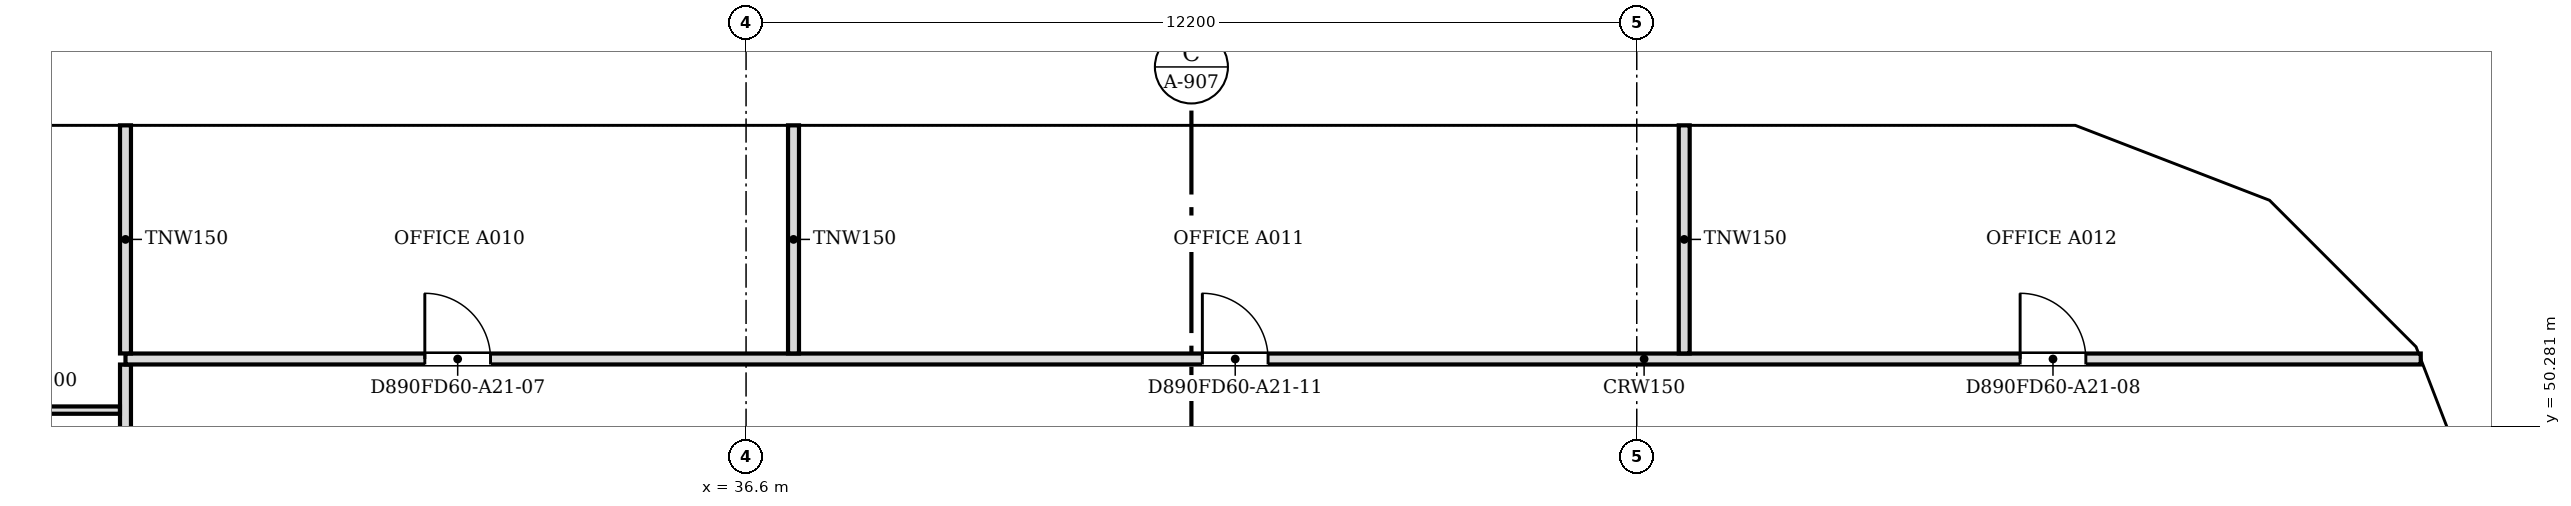
"""IFC4 building model, lengths in metres.
Left out: names, types, materials, properties, quantities, classifications, styles, units other than length and angle.
Written with IfcOpenShell. Run it as: python <this file> out.ifc"""

import sys

from ifc_helpers import new_model, si_unit, direction, frame, frame_2d, origin, place, context, subcontext, project, spatial, polyline, rectangle, outline, extrude, faceted_brep, source, transform, mapped, element, fill, save


model = new_model("IFC4")
c1 = context("Model", 3, precision=1e-05, world=origin(), true_north=direction((0.0, 1.0)))
c2 = subcontext(c1, "Body", "Model", "MODEL_VIEW")
j1 = project(units=[si_unit("LENGTHUNIT", "METRE"), si_unit("PLANEANGLEUNIT", "RADIAN")], contexts=[c1])
p1 = place(None, origin())
s1 = spatial("IfcSite", under=j1, at=p1, CompositionType="ELEMENT")
p2 = place(p1, origin())
s2 = spatial("IfcBuilding", under=s1, at=p2, CompositionType="ELEMENT")
p3 = place(p2, frame((0.0, 0.0, 248.3)))
s3 = spatial("IfcBuildingStorey", under=s2, at=p3, CompositionType="ELEMENT", Elevation=248.3)
m1 = source(origin(), c2, "Body", "Brep", [
    faceted_brep([(0.047, -0.25, 0.0), (2.997, -0.25, 3.8), (0.047, -0.25, 7.6), (0.0, -0.25, 7.541), (0.0, -0.25, 0.059), (0.093, 0.25, 7.54), (2.944, 0.25, 3.868), (2.944, 0.25, 3.732), (0.093, 0.25, 0.06), (2.997, 0.0, 3.8), (0.047, 0.0, 0.0), (0.047, 0.0, 7.6)], [[[0, 1, 2, 3, 4]], [[5, 6, 7, 8]], [[8, 7, 9, 1, 0, 10]], [[6, 5, 11, 2, 1, 9]], [[3, 2, 11]], [[10, 0, 4]], [[8, 10, 4, 3, 11, 5]], [[9, 7, 6]]]),
])
p4 = place(p3, frame((60.767, 48.71, -3.8), z_axis=(0.0, 0.0, 1.0), x_axis=(-0.359901446078, 0.932990326376, 0.0)))
e1 = element("IfcWall", 1, at=p4, inside=s3, PredefinedType="SOLIDWALL", context=c2, shape_type="MappedRepresentation", body=[
    mapped(m1, transform((0.0, 0.0, 0.0), scale=1.0)),
])
m2 = source(origin(), c2, "Body", "SweptSolid", [
    extrude(outline(polyline([(0.247, 0.665), (2.681, 3.8), (0.247, 6.935), (0.247, 0.665)])), frame((0.0, 0.26, 0.0), z_axis=(0.0, -1.0, 0.0), x_axis=(1.0, 0.0, 0.0)), (0.0, 0.0, 1.0), 0.52),
])
p5 = place(p4, origin())
e2 = element("IfcOpeningElement", 2, at=p5, cuts=e1, PredefinedType="OPENING", context=c2, shape_type="MappedRepresentation", body=[
    mapped(m2, transform((0.0, 0.0, 0.0), scale=1.0)),
])
m3 = source(origin(), c2, "Body", "Brep", [
    faceted_brep([(2.944, -0.25, 0.0), (2.997, -0.25, 0.068), (2.997, -0.25, 7.532), (2.944, -0.25, 7.6), (0.0, -0.25, 3.8), (0.053, 0.25, 3.868), (2.891, 0.25, 7.532), (2.891, 0.25, 0.068), (0.053, 0.25, 3.732), (2.944, 0.0, 0.0), (2.944, 0.0, 7.6), (0.0, 0.0, 3.8)], [[[0, 1, 2, 3, 4]], [[5, 6, 7, 8]], [[1, 0, 9]], [[10, 3, 2]], [[6, 5, 11, 4, 3, 10]], [[8, 7, 9, 0, 4, 11]], [[8, 11, 5]], [[1, 9, 7, 6, 10, 2]]]),
])
p6 = place(p3, frame((59.688, 51.506, -3.8), z_axis=(0.0, 0.0, 1.0), x_axis=(-0.707106781187, 0.707106781187, 0.0)))
e3 = element("IfcWall", 3, at=p6, inside=s3, PredefinedType="SOLIDWALL", context=c2, shape_type="MappedRepresentation", body=[
    mapped(m3, transform((0.0, 0.0, 0.0), scale=1.0)),
])
m4 = source(origin(), c2, "Body", "SweptSolid", [
    extrude(outline(polyline([(2.744, 6.934), (0.316, 3.8), (2.744, 0.666), (2.744, 6.934)])), frame((0.0, 0.26, 0.0), z_axis=(0.0, -1.0, 0.0), x_axis=(1.0, 0.0, 0.0)), (0.0, 0.0, 1.0), 0.52),
])
p7 = place(p6, origin())
e4 = element("IfcOpeningElement", 4, at=p7, cuts=e3, PredefinedType="OPENING", context=c2, shape_type="MappedRepresentation", body=[
    mapped(m4, transform((0.0, 0.0, 0.0), scale=1.0)),
])
m5 = source(origin(), c2, "Body", "Brep", [
    faceted_brep([(0.053, -0.25, 0.0), (3.003, -0.25, 3.8), (0.053, -0.25, 7.6), (0.0, -0.25, 7.532), (0.0, -0.25, 0.068), (0.106, 0.25, 7.532), (2.957, 0.25, 3.86), (2.957, 0.25, 3.74), (0.106, 0.25, 0.068), (3.003, 0.0, 3.8), (0.053, 0.0, 0.0), (0.053, 0.0, 7.6)], [[[0, 1, 2, 3, 4]], [[5, 6, 7, 8]], [[8, 7, 9, 1, 0, 10]], [[6, 5, 11, 2, 1, 9]], [[3, 2, 11]], [[10, 0, 4]], [[8, 10, 4, 3, 11, 5]], [[9, 7, 6]]]),
])
p8 = place(p3, frame((57.656, 53.569, -3.8), z_axis=(0.0, 0.0, 1.0), x_axis=(-0.933007896601, 0.359855894603, 0.0)))
e5 = element("IfcWall", 5, at=p8, inside=s3, PredefinedType="SOLIDWALL", context=c2, shape_type="MappedRepresentation", body=[
    mapped(m5, transform((0.0, 0.0, 0.0), scale=1.0)),
])
m6 = source(origin(), c2, "Body", "SweptSolid", [
    extrude(outline(polyline([(0.253, 0.665), (2.687, 3.8), (0.253, 6.935), (0.253, 0.665)])), frame((0.0, 0.26, 0.0), z_axis=(0.0, -1.0, 0.0), x_axis=(1.0, 0.0, 0.0)), (0.0, 0.0, 1.0), 0.52),
])
p9 = place(p8, origin())
e6 = element("IfcOpeningElement", 6, at=p9, cuts=e5, PredefinedType="OPENING", context=c2, shape_type="MappedRepresentation", body=[
    mapped(m6, transform((0.0, 0.0, 0.0), scale=1.0)),
])
m7 = source(origin(), c2, "Body", "Brep", [
    faceted_brep([(3.003, -0.25, 0.0), (6.053, -0.25, 3.8), (3.003, -0.25, 7.6), (0.0, -0.25, 3.8), (0.047, 0.25, 3.859), (3.003, 0.25, 7.6), (6.053, 0.25, 3.8), (3.003, 0.25, 0.0), (0.047, 0.25, 3.741), (0.0, 0.0, 3.8)], [[[0, 1, 2, 3]], [[4, 5, 6, 7, 8]], [[7, 6, 1, 0]], [[6, 5, 2, 1]], [[5, 4, 9, 3, 2]], [[8, 7, 0, 3, 9]], [[8, 9, 4]]]),
])
p10 = place(p3, frame((54.854, 54.65, -3.8), z_axis=(0.0, 0.0, 1.0), x_axis=(-1.0, 0.0, 0.0)))
e7 = element("IfcWall", 7, at=p10, inside=s3, PredefinedType="SOLIDWALL", context=c2, shape_type="MappedRepresentation", body=[
    mapped(m7, transform((0.0, 0.0, 0.0), scale=1.0)),
])
m8 = source(origin(), c2, "Body", "SweptSolid", [
    extrude(outline(polyline([(3.005, 0.401), (5.733, 3.8), (3.005, 7.199), (0.319, 3.8), (3.005, 0.401)])), frame((0.0, 0.26, 0.0), z_axis=(0.0, -1.0, 0.0), x_axis=(1.0, 0.0, 0.0)), (0.0, 0.0, 1.0), 0.52),
])
p11 = place(p10, origin())
e8 = element("IfcOpeningElement", 8, at=p11, cuts=e7, PredefinedType="OPENING", context=c2, shape_type="MappedRepresentation", body=[
    mapped(m8, transform((0.0, 0.0, 0.0), scale=1.0)),
])
m9 = source(origin(), c2, "Body", "SweptSolid", [
    extrude(outline(polyline([(3.05, 0.0), (6.1, 3.8), (3.05, 7.6), (0.0, 3.8), (3.05, 0.0)])), frame((0.0, 0.25, 0.0), z_axis=(0.0, -1.0, 0.0), x_axis=(1.0, 0.0, 0.0)), (0.0, 0.0, 1.0), 0.5),
])
p12 = place(p3, frame((48.8, 54.65, -3.8), z_axis=(0.0, 0.0, 1.0), x_axis=(-1.0, 0.0, 0.0)))
e9 = element("IfcWall", 9, at=p12, inside=s3, PredefinedType="SOLIDWALL", context=c2, shape_type="MappedRepresentation", body=[
    mapped(m9, transform((0.0, 0.0, 0.0), scale=1.0)),
])
m10 = source(origin(), c2, "Body", "SweptSolid", [
    extrude(outline(polyline([(3.05, 0.399), (5.78, 3.8), (3.05, 7.201), (0.321, 3.8), (3.05, 0.399)])), frame((0.0, 0.26, 0.0), z_axis=(0.0, -1.0, 0.0), x_axis=(1.0, 0.0, 0.0)), (0.0, 0.0, 1.0), 0.52),
])
p13 = place(p12, origin())
e10 = element("IfcOpeningElement", 10, at=p13, cuts=e9, PredefinedType="OPENING", context=c2, shape_type="MappedRepresentation", body=[
    mapped(m10, transform((0.0, 0.0, 0.0), scale=1.0)),
])
m11 = source(origin(), c2, "Body", "Brep", [
    faceted_brep([(3.05, -0.25, 0.0), (6.1, -0.25, 3.8), (6.1, -0.25, 3.8), (3.05, -0.25, 7.6), (0.0, -0.25, 3.8), (0.0, 0.25, 3.8), (3.05, 0.25, 7.6), (6.1, 0.25, 3.8), (6.1, 0.25, 3.8), (3.05, 0.25, 0.0)], [[[0, 1, 2, 3, 4]], [[5, 6, 7, 8, 9]], [[9, 8, 1, 0]], [[7, 6, 3, 2]], [[6, 5, 4, 3]], [[5, 9, 0, 4]], [[1, 8, 7, 2]]]),
])
p14 = place(p3, frame((42.7, 54.65, -3.8), z_axis=(0.0, 0.0, 1.0), x_axis=(-1.0, 0.0, 0.0)))
e11 = element("IfcWall", 11, at=p14, inside=s3, PredefinedType="SOLIDWALL", context=c2, shape_type="MappedRepresentation", body=[
    mapped(m11, transform((0.0, 0.0, 0.0), scale=1.0)),
])
p15 = place(p14, origin())
e12 = element("IfcOpeningElement", 12, at=p15, cuts=e11, PredefinedType="OPENING", context=c2, shape_type="MappedRepresentation", body=[
    mapped(m10, transform((0.0, 0.0, 0.0), scale=1.0)),
])
p16 = place(p3, frame((36.6, 54.65, -3.8), z_axis=(0.0, 0.0, 1.0), x_axis=(-1.0, 0.0, 0.0)))
e13 = element("IfcWall", 13, at=p16, inside=s3, PredefinedType="SOLIDWALL", context=c2, shape_type="MappedRepresentation", body=[
    mapped(m9, transform((0.0, 0.0, 0.0), scale=1.0)),
])
p17 = place(p16, origin())
e14 = element("IfcOpeningElement", 14, at=p17, cuts=e13, PredefinedType="OPENING", context=c2, shape_type="MappedRepresentation", body=[
    mapped(m10, transform((0.0, 0.0, 0.0), scale=1.0)),
])
p18 = place(p3, frame((30.5, 54.65, -3.8), z_axis=(0.0, 0.0, 1.0), x_axis=(-1.0, 0.0, 0.0)))
e15 = element("IfcWall", 15, at=p18, inside=s3, PredefinedType="SOLIDWALL", context=c2, shape_type="MappedRepresentation", body=[
    mapped(m9, transform((0.0, 0.0, 0.0), scale=1.0)),
])
p19 = place(p18, origin())
e16 = element("IfcOpeningElement", 16, at=p19, cuts=e15, PredefinedType="OPENING", context=c2, shape_type="MappedRepresentation", body=[
    mapped(m10, transform((0.0, 0.0, 0.0), scale=1.0)),
])
p20 = place(p2, frame((0.0, 0.0, 252.1)))
s4 = spatial("IfcBuildingStorey", under=s2, at=p20, CompositionType="ELEMENT", Elevation=252.1)
m12 = source(origin(), c2, "Body", "Brep", [
    faceted_brep([(2.95, -0.25, 0.0), (3.003, -0.25, 0.068), (3.003, -0.25, 7.531), (2.95, -0.25, 7.6), (0.0, -0.25, 3.8), (0.047, 0.25, 3.86), (2.898, 0.25, 7.532), (2.898, 0.25, 0.068), (0.047, 0.25, 3.74), (2.95, 0.0, 0.0), (2.95, 0.0, 7.6), (0.0, 0.0, 3.8)], [[[0, 1, 2, 3, 4]], [[5, 6, 7, 8]], [[1, 0, 9]], [[10, 3, 2]], [[6, 5, 11, 4, 3, 10]], [[8, 7, 9, 0, 4, 11]], [[8, 11, 5]], [[1, 9, 7, 6, 10, 2]]]),
])
p21 = place(p20, frame((60.75, 48.753, -3.8), z_axis=(0.0, 0.0, 1.0), x_axis=(-0.35992665181, 0.932980602862, 0.0)))
e17 = element("IfcWall", 17, at=p21, inside=s4, PredefinedType="SOLIDWALL", context=c2, shape_type="MappedRepresentation", body=[
    mapped(m12, transform((0.0, 0.0, 0.0), scale=1.0)),
])
m13 = source(origin(), c2, "Body", "SweptSolid", [
    extrude(outline(polyline([(2.75, 6.935), (0.316, 3.8), (2.75, 0.665), (2.75, 6.935)])), frame((0.0, 0.26, 0.0), z_axis=(0.0, -1.0, 0.0), x_axis=(1.0, 0.0, 0.0)), (0.0, 0.0, 1.0), 0.52),
])
p22 = place(p21, origin())
e18 = element("IfcOpeningElement", 18, at=p22, cuts=e17, PredefinedType="OPENING", context=c2, shape_type="MappedRepresentation", body=[
    mapped(m13, transform((0.0, 0.0, 0.0), scale=1.0)),
])
m14 = source(origin(), c2, "Body", "Brep", [
    faceted_brep([(0.053, -0.25, 0.0), (2.997, -0.25, 3.8), (0.053, -0.25, 7.6), (0.0, -0.25, 7.532), (0.0, -0.25, 0.068), (0.106, 0.25, 7.531), (2.944, 0.25, 3.868), (2.944, 0.25, 3.732), (0.106, 0.25, 0.068), (2.997, 0.0, 3.8), (0.053, 0.0, 0.0), (0.053, 0.0, 7.6)], [[[0, 1, 2, 3, 4]], [[5, 6, 7, 8]], [[8, 7, 9, 1, 0, 10]], [[6, 5, 11, 2, 1, 9]], [[3, 2, 11]], [[10, 0, 4]], [[8, 10, 4, 3, 11, 5]], [[7, 6, 9]]]),
])
p23 = place(p20, frame((59.726, 51.469, -3.8), z_axis=(0.0, 0.0, 1.0), x_axis=(-0.707106781187, 0.707106781187, 0.0)))
e19 = element("IfcWall", 19, at=p23, inside=s4, PredefinedType="SOLIDWALL", context=c2, shape_type="MappedRepresentation", body=[
    mapped(m14, transform((0.0, 0.0, 0.0), scale=1.0)),
])
m15 = source(origin(), c2, "Body", "SweptSolid", [
    extrude(outline(polyline([(0.253, 0.666), (2.681, 3.8), (0.253, 6.934), (0.253, 0.666)])), frame((0.0, 0.26, 0.0), z_axis=(0.0, -1.0, 0.0), x_axis=(1.0, 0.0, 0.0)), (0.0, 0.0, 1.0), 0.52),
])
p24 = place(p23, origin())
e20 = element("IfcOpeningElement", 20, at=p24, cuts=e19, PredefinedType="OPENING", context=c2, shape_type="MappedRepresentation", body=[
    mapped(m15, transform((0.0, 0.0, 0.0), scale=1.0)),
])
m16 = source(origin(), c2, "Body", "Brep", [
    faceted_brep([(2.95, -0.25, 0.0), (2.997, -0.25, 0.059), (2.997, -0.25, 7.541), (2.95, -0.25, 7.6), (0.0, -0.25, 3.8), (0.053, 0.25, 3.868), (2.904, 0.25, 7.54), (2.904, 0.25, 0.06), (0.053, 0.25, 3.732), (2.95, 0.0, 0.0), (2.95, 0.0, 7.6), (0.0, 0.0, 3.8)], [[[0, 1, 2, 3, 4]], [[5, 6, 7, 8]], [[1, 0, 9]], [[10, 3, 2]], [[6, 5, 11, 4, 3, 10]], [[8, 7, 9, 0, 4, 11]], [[8, 11, 5]], [[1, 9, 7, 6, 10, 2]]]),
])
p25 = place(p20, frame((57.606, 53.588, -3.8), z_axis=(0.0, 0.0, 1.0), x_axis=(-0.932990326376, 0.359901446078, 0.0)))
e21 = element("IfcWall", 21, at=p25, inside=s4, PredefinedType="SOLIDWALL", context=c2, shape_type="MappedRepresentation", body=[
    mapped(m16, transform((0.0, 0.0, 0.0), scale=1.0)),
])
p26 = place(p25, origin())
e22 = element("IfcOpeningElement", 22, at=p26, cuts=e21, PredefinedType="OPENING", context=c2, shape_type="MappedRepresentation", body=[
    mapped(m13, transform((0.0, 0.0, 0.0), scale=1.0)),
])
m17 = source(origin(), c2, "Body", "Brep", [
    faceted_brep([(0.047, -0.25, 0.0), (3.05, -0.25, 3.8), (0.047, -0.25, 7.6), (0.0, -0.25, 7.54), (0.0, -0.25, 0.06), (0.093, 0.25, 7.541), (3.05, 0.25, 3.8), (0.093, 0.25, 0.059), (0.047, 0.0, 0.0), (0.047, 0.0, 7.6)], [[[0, 1, 2, 3, 4]], [[5, 6, 7]], [[7, 6, 1, 0, 8]], [[6, 5, 9, 2, 1]], [[3, 2, 9]], [[8, 0, 4]], [[7, 8, 4, 3, 9, 5]]]),
])
p27 = place(p20, frame((54.9, 54.65, -3.8), z_axis=(0.0, 0.0, 1.0), x_axis=(-1.0, 0.0, 0.0)))
e23 = element("IfcWall", 23, at=p27, inside=s4, PredefinedType="SOLIDWALL", context=c2, shape_type="MappedRepresentation", body=[
    mapped(m17, transform((0.0, 0.0, 0.0), scale=1.0)),
])
m18 = source(origin(), c2, "Body", "SweptSolid", [
    extrude(outline(polyline([(0.247, 0.656), (2.731, 3.8), (0.247, 6.944), (0.247, 0.656)])), frame((0.0, 0.26, 0.0), z_axis=(0.0, -1.0, 0.0), x_axis=(1.0, 0.0, 0.0)), (0.0, 0.0, 1.0), 0.52),
])
p28 = place(p27, origin())
e24 = element("IfcOpeningElement", 24, at=p28, cuts=e23, PredefinedType="OPENING", context=c2, shape_type="MappedRepresentation", body=[
    mapped(m18, transform((0.0, 0.0, 0.0), scale=1.0)),
])
m19 = source(origin(), c2, "Body", "SweptSolid", [
    extrude(outline(polyline([(3.05, 0.0), (6.1, 3.8), (3.05, 7.6), (0.0, 3.8), (3.05, 0.0)])), frame((0.0, 0.25, 0.0), z_axis=(0.0, -1.0, 0.0), x_axis=(1.0, 0.0, 0.0)), (0.0, 0.0, 1.0), 0.5),
])
p29 = place(p20, frame((51.85, 54.65, -3.8), z_axis=(0.0, 0.0, 1.0), x_axis=(-1.0, 0.0, 0.0)))
e25 = element("IfcWall", 25, at=p29, inside=s4, PredefinedType="SOLIDWALL", context=c2, shape_type="MappedRepresentation", body=[
    mapped(m19, transform((0.0, 0.0, 0.0), scale=1.0)),
])
m20 = source(origin(), c2, "Body", "SweptSolid", [
    extrude(outline(polyline([(3.05, 0.399), (5.78, 3.8), (3.05, 7.2), (0.321, 3.8), (3.05, 0.399)])), frame((0.0, 0.26, 0.0), z_axis=(0.0, -1.0, 0.0), x_axis=(1.0, 0.0, 0.0)), (0.0, 0.0, 1.0), 0.52),
])
p30 = place(p29, origin())
e26 = element("IfcOpeningElement", 26, at=p30, cuts=e25, PredefinedType="OPENING", context=c2, shape_type="MappedRepresentation", body=[
    mapped(m20, transform((0.0, 0.0, 0.0), scale=1.0)),
])
p31 = place(p20, frame((45.75, 54.65, -3.8), z_axis=(0.0, 0.0, 1.0), x_axis=(-1.0, 0.0, 0.0)))
e27 = element("IfcWall", 27, at=p31, inside=s4, PredefinedType="SOLIDWALL", context=c2, shape_type="MappedRepresentation", body=[
    mapped(m19, transform((0.0, 0.0, 0.0), scale=1.0)),
])
p32 = place(p31, origin())
e28 = element("IfcOpeningElement", 28, at=p32, cuts=e27, PredefinedType="OPENING", context=c2, shape_type="MappedRepresentation", body=[
    mapped(m20, transform((0.0, 0.0, 0.0), scale=1.0)),
])
m21 = source(origin(), c2, "Body", "Brep", [
    faceted_brep([(3.05, -0.25, 0.0), (6.1, -0.25, 3.8), (6.1, -0.25, 3.8), (3.05, -0.25, 7.6), (0.0, -0.25, 3.8), (0.0, 0.25, 3.8), (3.05, 0.25, 7.6), (6.1, 0.25, 3.8), (6.1, 0.25, 3.8), (3.05, 0.25, 0.0)], [[[0, 1, 2, 3, 4]], [[5, 6, 7, 8, 9]], [[9, 8, 1, 0]], [[7, 6, 3, 2]], [[6, 5, 4, 3]], [[5, 9, 0, 4]], [[1, 8, 7, 2]]]),
])
p33 = place(p20, frame((39.65, 54.65, -3.8), z_axis=(0.0, 0.0, 1.0), x_axis=(-1.0, 0.0, 0.0)))
e29 = element("IfcWall", 29, at=p33, inside=s4, PredefinedType="SOLIDWALL", context=c2, shape_type="MappedRepresentation", body=[
    mapped(m21, transform((0.0, 0.0, 0.0), scale=1.0)),
])
p34 = place(p33, origin())
e30 = element("IfcOpeningElement", 30, at=p34, cuts=e29, PredefinedType="OPENING", context=c2, shape_type="MappedRepresentation", body=[
    mapped(m20, transform((0.0, 0.0, 0.0), scale=1.0)),
])
p35 = place(p20, frame((33.55, 54.65, -3.8), z_axis=(0.0, 0.0, 1.0), x_axis=(-1.0, 0.0, 0.0)))
e31 = element("IfcWall", 31, at=p35, inside=s4, PredefinedType="SOLIDWALL", context=c2, shape_type="MappedRepresentation", body=[
    mapped(m19, transform((0.0, 0.0, 0.0), scale=1.0)),
])
p36 = place(p35, origin())
e32 = element("IfcOpeningElement", 32, at=p36, cuts=e31, PredefinedType="OPENING", context=c2, shape_type="MappedRepresentation", body=[
    mapped(m20, transform((0.0, 0.0, 0.0), scale=1.0)),
])
p37 = place(p20, frame((27.45, 54.65, -3.8), z_axis=(0.0, 0.0, 1.0), x_axis=(-1.0, 0.0, 0.0)))
e33 = element("IfcWall", 33, at=p37, inside=s4, PredefinedType="SOLIDWALL", context=c2, shape_type="MappedRepresentation", body=[
    mapped(m21, transform((0.0, 0.0, 0.0), scale=1.0)),
])
p38 = place(p37, origin())
e34 = element("IfcOpeningElement", 34, at=p38, cuts=e33, PredefinedType="OPENING", context=c2, shape_type="MappedRepresentation", body=[
    mapped(m20, transform((0.0, 0.0, 0.0), scale=1.0)),
])
p39 = place(p3, frame((28.1, 47.376, 0.0), z_axis=(0.0, 0.0, 1.0), x_axis=(0.0, 1.0, 0.0)))
e35 = element("IfcWall", 35, at=p39, inside=s3, PredefinedType="PARTITIONING", context=c2, shape_type="SweptSolid", body=[
    extrude(rectangle(XDim=3.748, YDim=0.15, at=frame_2d((1.874, 0.0))), origin(), (0.0, 0.0, 1.0), 3.067),
])
p40 = place(p3, frame((22.826, 50.5, 0.0), z_axis=(0.0, 0.0, 1.0), x_axis=(1.0, 0.0, 0.0)))
e36 = element("IfcWall", 36, at=p40, inside=s3, PredefinedType="PARTITIONING", context=c2, shape_type="SweptSolid", body=[
    extrude(rectangle(XDim=5.198, YDim=0.1, at=frame_2d((2.599, 0.0))), origin(), (0.0, 0.0, 1.0), 3.067),
])
m22 = source(origin(), c2, "Body", "SweptSolid", [
    extrude(rectangle(XDim=0.9, YDim=2.1, at=frame_2d((0.45, 1.05))), frame((0.0, 0.06, 0.0), z_axis=(0.0, -1.0, 0.0), x_axis=(1.0, 0.0, 0.0)), (0.0, 0.0, 1.0), 0.12),
])
p41 = place(p40, frame((2.1, 0.0, 0.0)))
e37 = element("IfcOpeningElement", 37, at=p41, cuts=e36, PredefinedType="OPENING", context=c2, shape_type="MappedRepresentation", body=[
    mapped(m22, transform((0.0, 0.0, 0.0), scale=1.0)),
])
p42 = place(p3, frame((28.1, 51.2, 0.0), z_axis=(0.0, 0.0, 1.0), x_axis=(1.0, 0.0, 0.0)))
e38 = element("IfcWall", 38, at=p42, inside=s3, PredefinedType="PARTITIONING", context=c2, shape_type="SweptSolid", body=[
    extrude(rectangle(XDim=31.438, YDim=0.15, at=frame_2d((15.719, 0.0))), origin(), (0.0, 0.0, 1.0), 3.067),
])
m23 = source(origin(), c2, "Body", "SweptSolid", [
    extrude(rectangle(XDim=0.9, YDim=2.1, at=frame_2d((0.45, 1.05))), frame((0.0, 0.085, 0.0), z_axis=(0.0, -1.0, 0.0), x_axis=(1.0, 0.0, 0.0)), (0.0, 0.0, 1.0), 0.17),
])
p43 = place(p42, frame((4.1, 0.0, 0.0)))
e39 = element("IfcOpeningElement", 39, at=p43, cuts=e38, PredefinedType="OPENING", context=c2, shape_type="MappedRepresentation", body=[
    mapped(m23, transform((0.0, 0.0, 0.0), scale=1.0)),
])
p44 = place(p42, frame((25.951, 0.0, 0.0)))
e40 = element("IfcOpeningElement", 40, at=p44, cuts=e38, PredefinedType="OPENING", context=c2, shape_type="MappedRepresentation", body=[
    mapped(m23, transform((0.0, 0.0, 0.0), scale=1.0)),
])
p45 = place(p42, frame((14.75, 0.0, 0.0)))
e41 = element("IfcOpeningElement", 41, at=p45, cuts=e38, PredefinedType="OPENING", context=c2, shape_type="MappedRepresentation", body=[
    mapped(m23, transform((0.0, 0.0, 0.0), scale=1.0)),
])
for number, where, z_axis, x_axis in (
    (42, (28.1, 51.276, 0.0), (0.0, 0.0, 1.0), (0.0, 1.0, 0.0)),
    (43, (37.25, 51.276, 0.0), (0.0, 0.0, 1.0), (0.0, 1.0, 0.0)),
    (44, (49.45, 51.276, 0.0), (0.0, 0.0, 1.0), (0.0, 1.0, 0.0)),
):
    element("IfcWall", number, at=place(p3, frame(where, z_axis=z_axis, x_axis=x_axis)), inside=s3, PredefinedType="PARTITIONING", context=c2, shape_type="SweptSolid", body=[
        extrude(rectangle(XDim=3.124, YDim=0.15, at=frame_2d((1.562, 0.0))), origin(), (0.0, 0.0, 1.0), 3.067),
    ])
m24 = source(origin(), c2, "Body", "SweptSolid", [
    extrude(rectangle(XDim=0.9, YDim=2.1, at=frame_2d((0.45, 1.05))), frame((0.0, 0.025, 0.0), z_axis=(0.0, -1.0, 0.0), x_axis=(1.0, 0.0, 0.0)), (0.0, 0.0, 1.0), 0.05),
])
p46 = place(p43, origin())
e45 = element("IfcDoor", 45, at=p46, inside=s3, OperationType="SINGLE_SWING_LEFT", PredefinedType="DOOR", context=c2, shape_type="MappedRepresentation", body=[
    mapped(m24, transform((0.0, 0.0, 0.0), scale=1.0)),
])
fill(e39, e45)
p47 = place(p44, origin())
e46 = element("IfcDoor", 46, at=p47, inside=s3, OperationType="SINGLE_SWING_LEFT", PredefinedType="DOOR", context=c2, shape_type="MappedRepresentation", body=[
    mapped(m24, transform((0.0, 0.0, 0.0), scale=1.0)),
])
fill(e40, e46)
p48 = place(p45, origin())
e47 = element("IfcDoor", 47, at=p48, inside=s3, OperationType="SINGLE_SWING_LEFT", PredefinedType="DOOR", context=c2, shape_type="MappedRepresentation", body=[
    mapped(m24, transform((0.0, 0.0, 0.0), scale=1.0)),
])
fill(e41, e47)
save(model, sys.argv[1])
